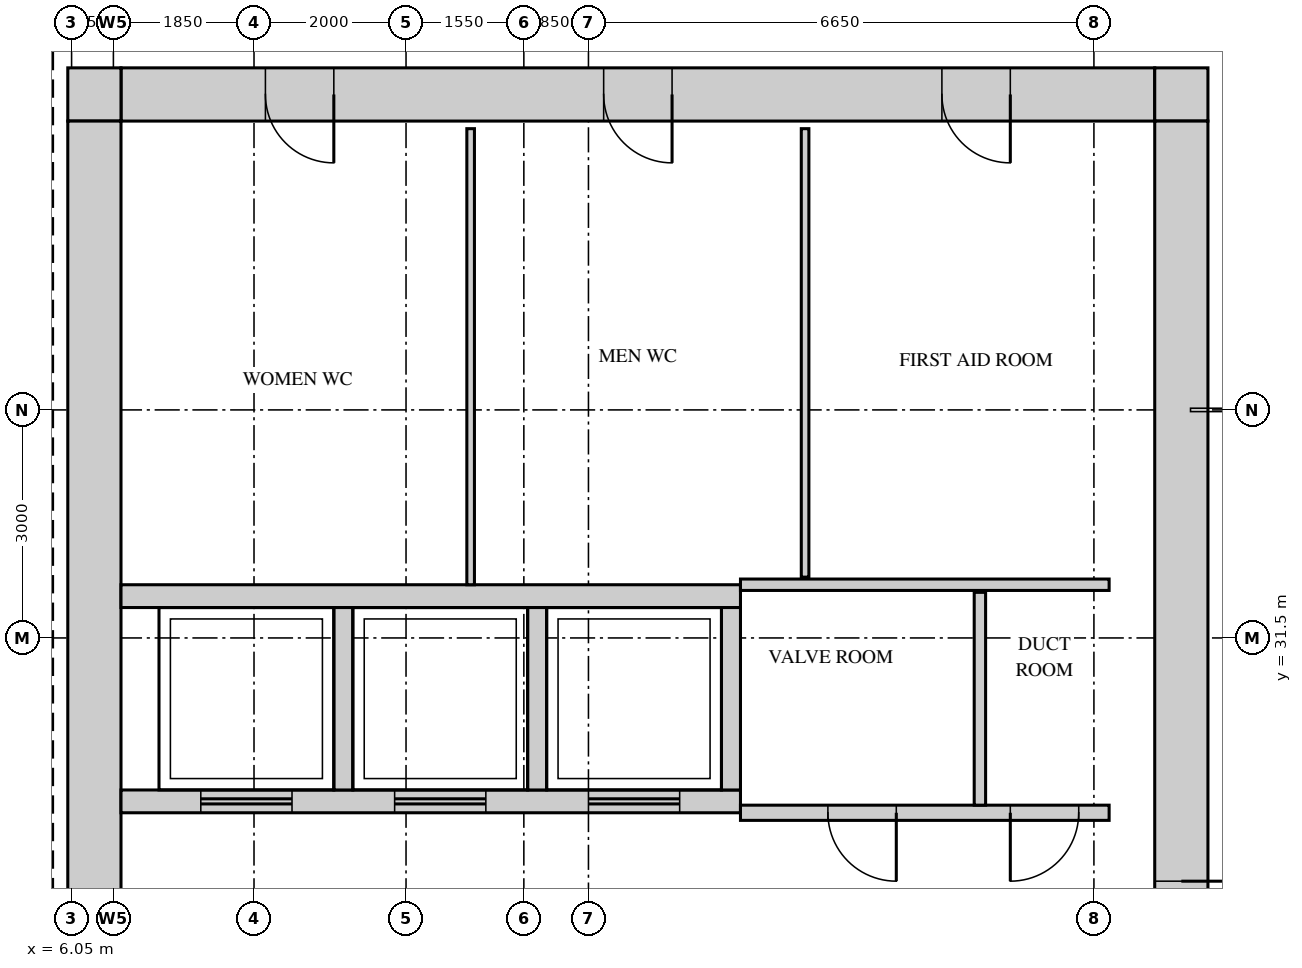
"""IFC4 building model, lengths in metres.
Left out: names, types, materials, properties, quantities, classifications, styles, units other than length and angle.
Written with IfcOpenShell. Run it as: python <this file> out.ifc"""

import sys

from ifc_helpers import new_model, si_unit, direction, frame, frame_2d, origin, place, context, subcontext, project, spatial, rectangle, extrude, source, transform, mapped, element, fill, save


model = new_model("IFC4")
c1 = context("Model", 3, precision=1e-05, world=origin(), true_north=direction((0.0, 1.0)))
c2 = subcontext(c1, "Body", "Model", "MODEL_VIEW")
j1 = project(units=[si_unit("LENGTHUNIT", "METRE"), si_unit("PLANEANGLEUNIT", "RADIAN")], contexts=[c1])
p1 = place(None, origin())
s1 = spatial("IfcSite", under=j1, at=p1, CompositionType="ELEMENT")
p2 = place(p1, origin())
s2 = spatial("IfcBuilding", under=s1, at=p2, CompositionType="ELEMENT")
p3 = place(p2, frame((0.0, 0.0, 274.2)))
s3 = spatial("IfcBuildingStorey", under=s2, at=p3, CompositionType="ELEMENT", Elevation=274.2)
m1 = source(origin(), c2, "Body", "SweptSolid", [
    extrude(rectangle(XDim=13.6, YDim=0.7, at=frame_2d((6.8, 0.0))), origin(), (0.0, 0.0, 1.0), 7.75),
])
p4 = place(p3, frame((6.7, 38.65, 0.0), z_axis=(0.0, 0.0, 1.0), x_axis=(1.0, 0.0, 0.0)))
e1 = element("IfcWall", 1, at=p4, inside=s3, PredefinedType="SHEAR", context=c2, shape_type="MappedRepresentation", body=[
    mapped(m1, transform((0.0, 0.0, 0.0))),
])
m2 = source(origin(), c2, "Body", "SweptSolid", [
    extrude(rectangle(XDim=0.9, YDim=2.1, at=frame_2d((0.45, 1.05))), frame((0.0, 0.36, 0.0), z_axis=(0.0, -1.0, 0.0), x_axis=(1.0, 0.0, 0.0)), (0.0, 0.0, 1.0), 0.72),
])
p5 = place(p4, frame((1.9, 0.0, 0.0)))
e2 = element("IfcOpeningElement", 2, at=p5, cuts=e1, PredefinedType="OPENING", context=c2, shape_type="MappedRepresentation", body=[
    mapped(m2, transform((0.0, 0.0, 0.0))),
])
p6 = place(p4, frame((6.35, 0.0, 0.0)))
e3 = element("IfcOpeningElement", 3, at=p6, cuts=e1, PredefinedType="OPENING", context=c2, shape_type="MappedRepresentation", body=[
    mapped(m2, transform((0.0, 0.0, 0.0))),
])
p7 = place(p4, frame((10.8, 0.0, 0.0)))
e4 = element("IfcOpeningElement", 4, at=p7, cuts=e1, PredefinedType="OPENING", context=c2, shape_type="MappedRepresentation", body=[
    mapped(m2, transform((0.0, 0.0, 0.0))),
])
m3 = source(origin(), c2, "Body", "SweptSolid", [
    extrude(rectangle(XDim=0.7, YDim=0.7, at=frame_2d((0.35, 0.0))), origin(), (0.0, 0.0, 1.0), 7.75),
])
for number, where, z_axis, x_axis in (
    (5, (20.3, 38.65, 0.0), (0.0, 0.0, 1.0), (1.0, 0.0, 0.0)),
    (6, (6.0, 38.65, 0.0), (0.0, 0.0, 1.0), (1.0, 0.0, 0.0)),
):
    element("IfcWall", number, at=place(p3, frame(where, z_axis=z_axis, x_axis=x_axis)), inside=s3, PredefinedType="SHEAR", context=c2, shape_type="MappedRepresentation", body=[
        mapped(m3, transform((0.0, 0.0, 0.0))),
    ])
m4 = source(origin(), c2, "Body", "SweptSolid", [
    extrude(rectangle(XDim=22.6, YDim=0.7, at=frame_2d((11.3, 0.0))), origin(), (0.0, 0.0, 1.0), 7.75),
])
p8 = place(p3, frame((20.65, 15.7, 0.0), z_axis=(0.0, 0.0, 1.0), x_axis=(0.0, 1.0, 0.0)))
e7 = element("IfcWall", 7, at=p8, inside=s3, PredefinedType="SHEAR", context=c2, shape_type="MappedRepresentation", body=[
    mapped(m4, transform((0.0, 0.0, 0.0))),
])
m5 = source(origin(), c2, "Body", "SweptSolid", [
    extrude(rectangle(XDim=1.8, YDim=2.1, at=frame_2d((0.9, 1.05))), frame((0.0, 0.36, 0.0), z_axis=(0.0, -1.0, 0.0), x_axis=(1.0, 0.0, 0.0)), (0.0, 0.0, 1.0), 0.72),
])
p9 = place(p8, frame((10.8, 0.0, 0.0)))
e8 = element("IfcOpeningElement", 8, at=p9, cuts=e7, PredefinedType="OPENING", context=c2, shape_type="MappedRepresentation", body=[
    mapped(m5, transform((0.0, 0.0, 0.0))),
])
p10 = place(p8, frame((0.45, 0.0, 0.0)))
e9 = element("IfcOpeningElement", 9, at=p10, cuts=e7, PredefinedType="OPENING", context=c2, shape_type="MappedRepresentation", body=[
    mapped(m2, transform((0.0, 0.0, 0.0))),
])
p11 = place(p8, frame((2.9, 0.0, 0.0)))
e10 = element("IfcOpeningElement", 10, at=p11, cuts=e7, PredefinedType="OPENING", context=c2, shape_type="MappedRepresentation", body=[
    mapped(m2, transform((0.0, 0.0, 0.0))),
])
m6 = source(origin(), c2, "Body", "SweptSolid", [
    extrude(rectangle(XDim=1.0, YDim=2.1, at=frame_2d((0.5, 1.05))), frame((0.0, 0.36, 0.0), z_axis=(0.0, -1.0, 0.0), x_axis=(1.0, 0.0, 0.0)), (0.0, 0.0, 1.0), 0.72),
])
p12 = place(p8, frame((5.6, 0.0, 0.0)))
e11 = element("IfcOpeningElement", 11, at=p12, cuts=e7, PredefinedType="OPENING", context=c2, shape_type="MappedRepresentation", body=[
    mapped(m6, transform((0.0, 0.0, 0.0))),
])
p13 = place(p3, frame((6.35, 15.7, 0.0), z_axis=(0.0, 0.0, 1.0), x_axis=(0.0, 1.0, 0.0)))
e12 = element("IfcWall", 12, at=p13, inside=s3, PredefinedType="SHEAR", context=c2, shape_type="MappedRepresentation", body=[
    mapped(m4, transform((0.0, 0.0, 0.0))),
])
m7 = source(origin(), c2, "Body", "SweptSolid", [
    extrude(rectangle(XDim=8.15, YDim=0.3, at=frame_2d((4.075, 0.0))), origin(), (0.0, 0.0, 1.0), 7.75),
])
p14 = place(p3, frame((6.7, 32.05, 0.0), z_axis=(0.0, 0.0, 1.0), x_axis=(1.0, 0.0, 0.0)))
e13 = element("IfcWall", 13, at=p14, inside=s3, PredefinedType="STANDARD", context=c2, shape_type="MappedRepresentation", body=[
    mapped(m7, transform((0.0, 0.0, 0.0))),
])
p15 = place(p3, frame((6.7, 29.35, 0.0), z_axis=(0.0, 0.0, 1.0), x_axis=(1.0, 0.0, 0.0)))
e14 = element("IfcWall", 14, at=p15, inside=s3, PredefinedType="STANDARD", context=c2, shape_type="MappedRepresentation", body=[
    mapped(m7, transform((0.0, 0.0, 0.0))),
])
m8 = source(origin(), c2, "Body", "SweptSolid", [
    extrude(rectangle(XDim=1.2, YDim=2.1, at=frame_2d((0.6, 1.05))), frame((0.0, 0.16, 0.0), z_axis=(0.0, -1.0, 0.0), x_axis=(1.0, 0.0, 0.0)), (0.0, 0.0, 1.0), 0.32),
])
p16 = place(p15, frame((1.05, 0.0, 0.0)))
e15 = element("IfcOpeningElement", 15, at=p16, cuts=e14, PredefinedType="OPENING", context=c2, shape_type="MappedRepresentation", body=[
    mapped(m8, transform((0.0, 0.0, 0.0))),
])
p17 = place(p15, frame((3.6, 0.0, 0.0)))
e16 = element("IfcOpeningElement", 16, at=p17, cuts=e14, PredefinedType="OPENING", context=c2, shape_type="MappedRepresentation", body=[
    mapped(m8, transform((0.0, 0.0, 0.0))),
])
p18 = place(p15, frame((6.15, 0.0, 0.0)))
e17 = element("IfcOpeningElement", 17, at=p18, cuts=e14, PredefinedType="OPENING", context=c2, shape_type="MappedRepresentation", body=[
    mapped(m8, transform((0.0, 0.0, 0.0))),
])
m9 = source(origin(), c2, "Body", "SweptSolid", [
    extrude(rectangle(XDim=2.4, YDim=0.25, at=frame_2d((1.2, 0.0))), origin(), (0.0, 0.0, 1.0), 7.75),
])
for number, where, z_axis, x_axis in (
    (18, (9.625, 29.5, 0.0), (0.0, 0.0, 1.0), (0.0, 1.0, 0.0)),
    (19, (12.175, 29.5, 0.0), (0.0, 0.0, 1.0), (0.0, 1.0, 0.0)),
    (20, (14.725, 29.5, 0.0), (0.0, 0.0, 1.0), (0.0, 1.0, 0.0)),
):
    element("IfcWall", number, at=place(p3, frame(where, z_axis=z_axis, x_axis=x_axis)), inside=s3, PredefinedType="STANDARD", context=c2, shape_type="MappedRepresentation", body=[
        mapped(m9, transform((0.0, 0.0, 0.0))),
    ])
m10 = source(origin(), c2, "Body", "SweptSolid", [
    extrude(rectangle(XDim=4.85, YDim=0.2, at=frame_2d((2.425, 0.0))), origin(), (0.0, 0.0, 1.0), 7.75),
])
p19 = place(p3, frame((14.85, 29.2, 0.0), z_axis=(0.0, 0.0, 1.0), x_axis=(1.0, 0.0, 0.0)))
e21 = element("IfcWall", 21, at=p19, inside=s3, PredefinedType="PARTITIONING", context=c2, shape_type="MappedRepresentation", body=[
    mapped(m10, transform((0.0, 0.0, 0.0))),
])
m11 = source(origin(), c2, "Body", "SweptSolid", [
    extrude(rectangle(XDim=0.9, YDim=2.1, at=frame_2d((0.45, 1.05))), frame((0.0, 0.11, 0.0), z_axis=(0.0, -1.0, 0.0), x_axis=(1.0, 0.0, 0.0)), (0.0, 0.0, 1.0), 0.22),
])
p20 = place(p19, frame((1.15, 0.0, 0.0)))
e22 = element("IfcOpeningElement", 22, at=p20, cuts=e21, PredefinedType="OPENING", context=c2, shape_type="MappedRepresentation", body=[
    mapped(m11, transform((0.0, 0.0, 0.0))),
])
p21 = place(p19, frame((3.55, 0.0, 0.0)))
e23 = element("IfcOpeningElement", 23, at=p21, cuts=e21, PredefinedType="OPENING", context=c2, shape_type="MappedRepresentation", body=[
    mapped(m11, transform((0.0, 0.0, 0.0))),
])
m12 = source(origin(), c2, "Body", "SweptSolid", [
    extrude(rectangle(XDim=2.8, YDim=0.15, at=frame_2d((1.4, 0.0))), origin(), (0.0, 0.0, 1.0), 7.75),
])
p22 = place(p3, frame((18.0, 29.3, 0.0), z_axis=(0.0, 0.0, 1.0), x_axis=(0.0, 1.0, 0.0)))
e24 = element("IfcWall", 24, at=p22, inside=s3, PredefinedType="PARTITIONING", context=c2, shape_type="MappedRepresentation", body=[
    mapped(m12, transform((0.0, 0.0, 0.0))),
])
m13 = source(origin(), c2, "Body", "SweptSolid", [
    extrude(rectangle(XDim=6.0, YDim=0.1, at=frame_2d((3.0, 0.0))), origin(), (0.0, 0.0, 1.0), 7.75),
])
p23 = place(p3, frame((11.3, 32.2, 0.0), z_axis=(0.0, 0.0, 1.0), x_axis=(0.0, 1.0, 0.0)))
e25 = element("IfcWall", 25, at=p23, inside=s3, PredefinedType="PARTITIONING", context=c2, shape_type="MappedRepresentation", body=[
    mapped(m13, transform((0.0, 0.0, 0.0))),
])
m14 = source(origin(), c2, "Body", "SweptSolid", [
    extrude(rectangle(XDim=4.85, YDim=0.15, at=frame_2d((2.425, 0.0))), origin(), (0.0, 0.0, 1.0), 7.75),
])
p24 = place(p3, frame((14.85, 32.2, 0.0), z_axis=(0.0, 0.0, 1.0), x_axis=(1.0, 0.0, 0.0)))
e26 = element("IfcWall", 26, at=p24, inside=s3, PredefinedType="PARTITIONING", context=c2, shape_type="MappedRepresentation", body=[
    mapped(m14, transform((0.0, 0.0, 0.0))),
])
m15 = source(origin(), c2, "Body", "SweptSolid", [
    extrude(rectangle(XDim=5.9, YDim=0.1, at=frame_2d((2.95, 0.0))), origin(), (0.0, 0.0, 1.0), 7.75),
])
p25 = place(p3, frame((15.7, 32.3, 0.0), z_axis=(0.0, 0.0, 1.0), x_axis=(0.0, 1.0, 0.0)))
e27 = element("IfcWall", 27, at=p25, inside=s3, PredefinedType="PARTITIONING", context=c2, shape_type="MappedRepresentation", body=[
    mapped(m15, transform((0.0, 0.0, 0.0))),
])
m16 = source(origin(), c2, "Body", "SweptSolid", [
    extrude(rectangle(XDim=0.9, YDim=2.1, at=frame_2d((0.45, 1.05))), frame((0.0, 0.025, 0.0), z_axis=(0.0, -1.0, 0.0), x_axis=(1.0, 0.0, 0.0)), (0.0, 0.0, 1.0), 0.05),
])
p26 = place(p20, origin())
e28 = element("IfcDoor", 28, at=p26, inside=s3, OperationType="SINGLE_SWING_RIGHT", PredefinedType="DOOR", context=c2, shape_type="MappedRepresentation", body=[
    mapped(m16, transform((0.0, 0.0, 0.0))),
])
fill(e22, e28)
p27 = place(p21, origin())
e29 = element("IfcDoor", 29, at=p27, inside=s3, OperationType="SINGLE_SWING_LEFT", PredefinedType="DOOR", context=c2, shape_type="MappedRepresentation", body=[
    mapped(m16, transform((0.0, 0.0, 0.0))),
])
fill(e23, e29)
m17 = source(origin(), c2, "Body", "SweptSolid", [
    extrude(rectangle(XDim=1.8, YDim=2.1, at=frame_2d((0.9, 1.05))), frame((0.0, 0.3, 0.0), z_axis=(0.0, -1.0, 0.0), x_axis=(1.0, 0.0, 0.0)), (0.0, 0.0, 1.0), 0.6),
])
p28 = place(p9, origin())
e30 = element("IfcDoor", 30, at=p28, inside=s3, OperationType="DOUBLE_DOOR_SINGLE_SWING", PredefinedType="DOOR", context=c2, shape_type="MappedRepresentation", body=[
    mapped(m17, transform((0.0, 0.0, 0.0))),
])
fill(e8, e30)
m18 = source(origin(), c2, "Body", "SweptSolid", [
    extrude(rectangle(XDim=0.9, YDim=2.1, at=frame_2d((0.45, 1.05))), frame((0.0, 0.3, 0.0), z_axis=(0.0, -1.0, 0.0), x_axis=(1.0, 0.0, 0.0)), (0.0, 0.0, 1.0), 0.6),
])
p29 = place(p5, origin())
e31 = element("IfcDoor", 31, at=p29, inside=s3, OperationType="SINGLE_SWING_RIGHT", PredefinedType="DOOR", context=c2, shape_type="MappedRepresentation", body=[
    mapped(m18, transform((0.0, 0.0, 0.0))),
])
fill(e2, e31)
p30 = place(p6, origin())
e32 = element("IfcDoor", 32, at=p30, inside=s3, OperationType="SINGLE_SWING_RIGHT", PredefinedType="DOOR", context=c2, shape_type="MappedRepresentation", body=[
    mapped(m18, transform((0.0, 0.0, 0.0))),
])
fill(e3, e32)
p31 = place(p7, origin())
e33 = element("IfcDoor", 33, at=p31, inside=s3, OperationType="SINGLE_SWING_RIGHT", PredefinedType="DOOR", context=c2, shape_type="MappedRepresentation", body=[
    mapped(m18, transform((0.0, 0.0, 0.0))),
])
fill(e4, e33)
m19 = source(origin(), c2, "Body", "SweptSolid", [
    extrude(rectangle(XDim=1.2, YDim=2.1, at=frame_2d((0.6, 1.05))), frame((0.0, 0.025, 0.0), z_axis=(0.0, -1.0, 0.0), x_axis=(1.0, 0.0, 0.0)), (0.0, 0.0, 1.0), 0.05),
])
p32 = place(p16, origin())
e34 = element("IfcDoor", 34, at=p32, inside=s3, OperationType="DOUBLE_DOOR_SLIDING", PredefinedType="DOOR", context=c2, shape_type="MappedRepresentation", body=[
    mapped(m19, transform((0.0, 0.0, 0.0))),
])
fill(e15, e34)
p33 = place(p17, origin())
e35 = element("IfcDoor", 35, at=p33, inside=s3, OperationType="DOUBLE_DOOR_SLIDING", PredefinedType="DOOR", context=c2, shape_type="MappedRepresentation", body=[
    mapped(m19, transform((0.0, 0.0, 0.0))),
])
fill(e16, e35)
p34 = place(p18, origin())
e36 = element("IfcDoor", 36, at=p34, inside=s3, OperationType="DOUBLE_DOOR_SLIDING", PredefinedType="DOOR", context=c2, shape_type="MappedRepresentation", body=[
    mapped(m19, transform((0.0, 0.0, 0.0))),
])
fill(e17, e36)
save(model, sys.argv[1])
